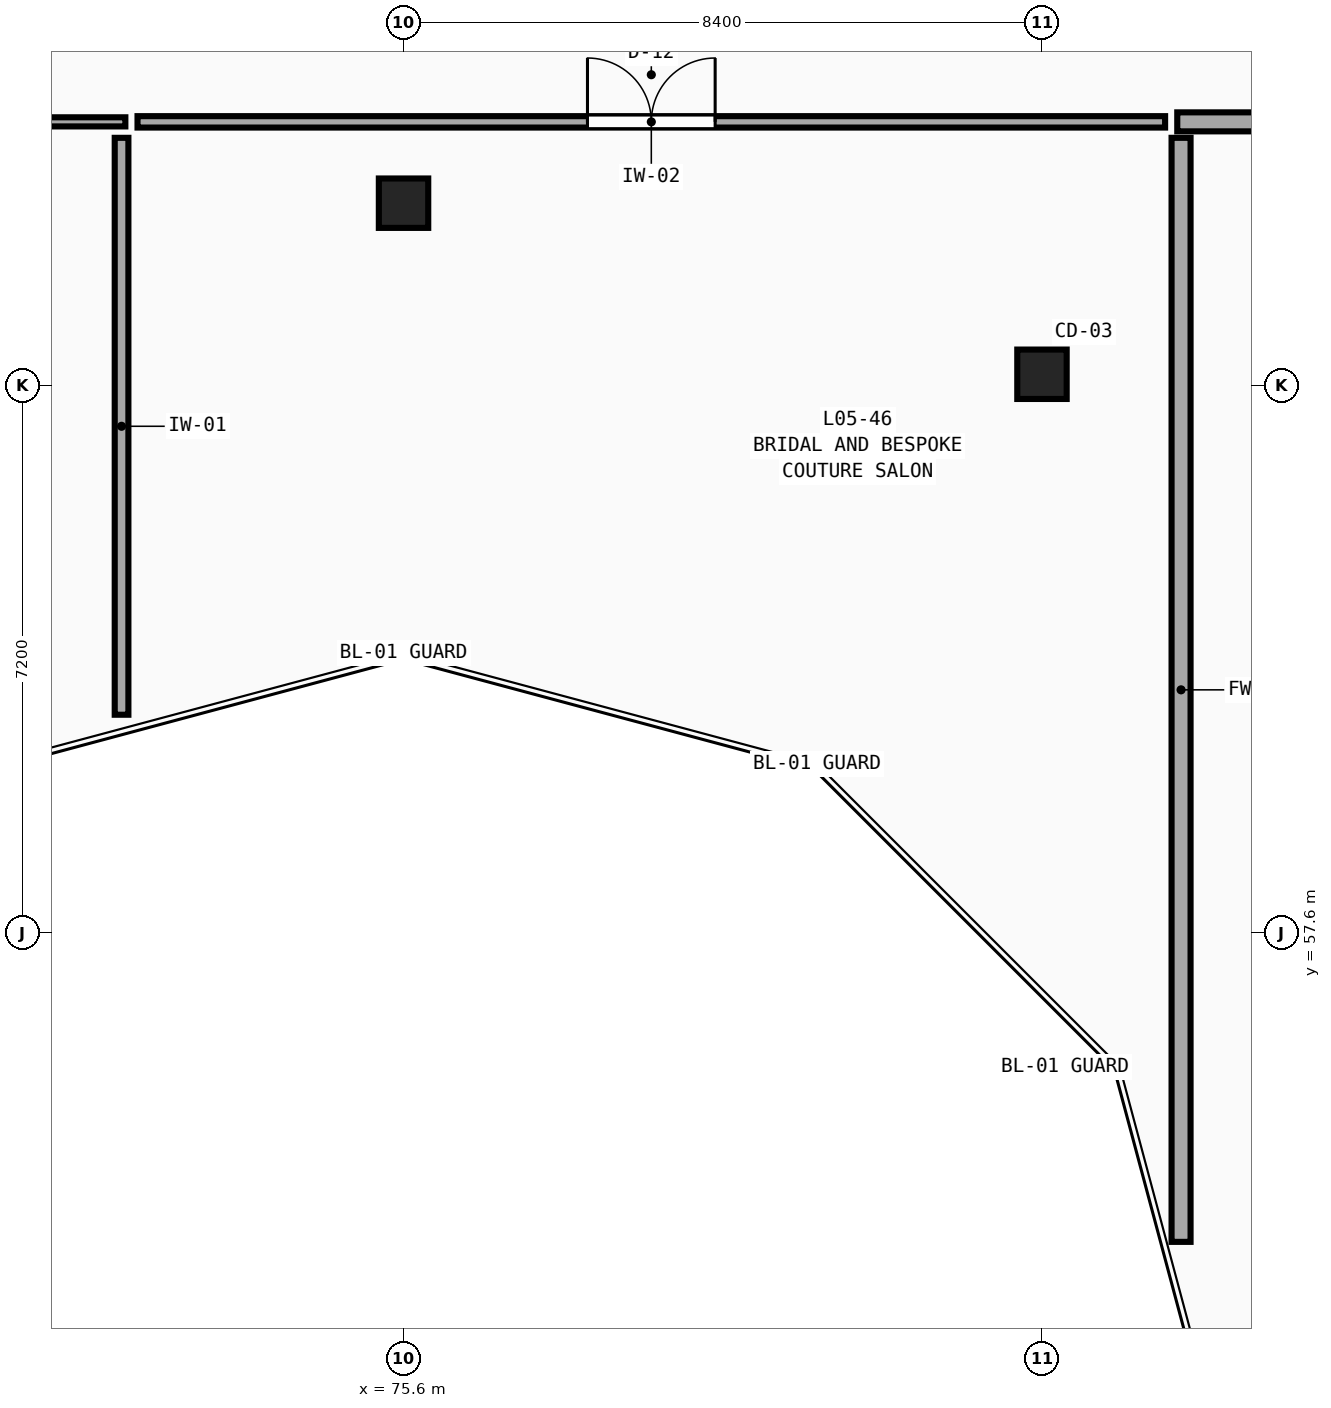
"""IFC4 building model, lengths in metres.
Left out: names, types, materials, properties, quantities, classifications, styles, units other than length and angle.
Written with IfcOpenShell. Run it as: python <this file> out.ifc"""

import sys

from ifc_helpers import new_model, si_unit, direction, frame, frame_2d, origin, origin_2d, place, context, subcontext, project, spatial, rectangle, circle, extrude, element, fill, save


model = new_model("IFC4")
c1 = context("Model", 3, precision=1e-05, world=origin(), true_north=direction((0.0, 1.0)))
c2 = subcontext(c1, "Body", "Model", "MODEL_VIEW")
j1 = project(units=[si_unit("LENGTHUNIT", "METRE"), si_unit("PLANEANGLEUNIT", "RADIAN")], contexts=[c1])
p1 = place(None, origin())
s1 = spatial("IfcSite", under=j1, at=p1, CompositionType="ELEMENT")
p2 = place(p1, origin())
s2 = spatial("IfcBuilding", under=s1, at=p2, CompositionType="ELEMENT")
p3 = place(p2, frame((0.0, 0.0, 23.4)))
s3 = spatial("IfcBuildingStorey", under=s2, at=p3, CompositionType="ELEMENT", Elevation=23.4)
for number, where, z_axis, x_axis in (
    (1, (84.0, 64.949, 0.0), (0.0, 0.0, 1.0), (1.0, 0.0, 0.0)),
    (2, (75.6, 67.2, 0.0), (0.0, 0.0, 1.0), (1.0, 0.0, 0.0)),
):
    element("IfcColumn", number, at=place(p3, frame(where, z_axis=z_axis, x_axis=x_axis)), inside=s3, PredefinedType="COLUMN", context=c2, shape_type="SweptSolid", body=[
        extrude(circle(Radius=0.325, at=origin_2d()), origin(), (0.0, 0.0, 1.0), 4.5),
    ])
p4 = place(p3, frame((55.68, 68.27, 0.0), z_axis=(0.0, 0.0, 1.0), x_axis=(1.0, 0.0, 0.0)))
e3 = element("IfcWall", 3, at=p4, inside=s3, PredefinedType="PARTITIONING", context=c2, shape_type="SweptSolid", body=[
    extrude(rectangle(XDim=16.26, YDim=0.12, at=frame_2d((8.13, 0.0))), origin(), (0.0, 0.0, 1.0), 4.21),
])
p5 = place(p4, frame((7.69, 0.0, 0.0)))
e4 = element("IfcOpeningElement", 4, at=p5, cuts=e3, PredefinedType="OPENING", context=c2, shape_type="SweptSolid", body=[
    extrude(rectangle(XDim=0.88, YDim=2.05, at=frame_2d((0.44, 1.025))), frame((0.0, 0.08, 0.0), z_axis=(0.0, -1.0, 0.0), x_axis=(1.0, 0.0, 0.0)), (0.0, 0.0, 1.0), 0.16),
])
p6 = place(p3, frame((72.1, 68.27, 0.0), z_axis=(0.0, 0.0, 1.0), x_axis=(1.0, 0.0, 0.0)))
e5 = element("IfcWall", 5, at=p6, inside=s3, PredefinedType="PARTITIONING", context=c2, shape_type="SweptSolid", body=[
    extrude(rectangle(XDim=13.52, YDim=0.15, at=frame_2d((6.76, 0.0))), origin(), (0.0, 0.0, 1.0), 4.21),
])
p7 = place(p6, frame((5.92, 0.0, 0.0)))
e6 = element("IfcOpeningElement", 6, at=p7, cuts=e5, PredefinedType="OPENING", context=c2, shape_type="SweptSolid", body=[
    extrude(rectangle(XDim=1.68, YDim=2.13, at=frame_2d((0.84, 1.065))), frame((0.0, 0.095, 0.0), z_axis=(0.0, -1.0, 0.0), x_axis=(1.0, 0.0, 0.0)), (0.0, 0.0, 1.0), 0.19),
])
p8 = place(p3, frame((85.78, 68.27, 0.0), z_axis=(0.0, 0.0, 1.0), x_axis=(1.0, 0.0, 0.0)))
e7 = element("IfcWall", 7, at=p8, inside=s3, PredefinedType="SOLIDWALL", context=c2, shape_type="SweptSolid", body=[
    extrude(rectangle(XDim=6.25, YDim=0.25, at=frame_2d((3.125, 0.0))), origin(), (0.0, 0.0, 1.0), 4.21),
])
p9 = place(p8, frame((2.6, 0.0, 0.0)))
e8 = element("IfcOpeningElement", 8, at=p9, cuts=e7, PredefinedType="OPENING", context=c2, shape_type="SweptSolid", body=[
    extrude(rectangle(XDim=1.05, YDim=2.15, at=frame_2d((0.525, 1.075))), frame((0.0, 0.145, 0.0), z_axis=(0.0, -1.0, 0.0), x_axis=(1.0, 0.0, 0.0)), (0.0, 0.0, 1.0), 0.29),
])
p10 = place(p3, frame((85.83, 53.535, 0.0), z_axis=(0.0, 0.0, 1.0), x_axis=(0.0, 1.0, 0.0)))
e9 = element("IfcWall", 9, at=p10, inside=s3, PredefinedType="SOLIDWALL", context=c2, shape_type="SweptSolid", body=[
    extrude(rectangle(XDim=14.525, YDim=0.25, at=frame_2d((7.263, 0.0))), origin(), (0.0, 0.0, 1.0), 4.21),
])
p11 = place(p3, frame((71.89, 60.47, 0.0), z_axis=(0.0, 0.0, 1.0), x_axis=(0.0, 1.0, 0.0)))
e10 = element("IfcWall", 10, at=p11, inside=s3, PredefinedType="PARTITIONING", context=c2, shape_type="SweptSolid", body=[
    extrude(rectangle(XDim=7.59, YDim=0.18, at=frame_2d((3.795, 0.0))), origin(), (0.0, 0.0, 1.0), 4.21),
])
p12 = place(p7, origin())
e11 = element("IfcDoor", 11, at=p12, inside=s3, OperationType="DOUBLE_DOOR_SINGLE_SWING", PredefinedType="DOOR", context=c2, shape_type="SweptSolid", body=[
    extrude(rectangle(XDim=1.68, YDim=2.13, at=frame_2d((0.84, 1.065))), frame((0.0, 0.025, 0.0), z_axis=(0.0, -1.0, 0.0), x_axis=(1.0, 0.0, 0.0)), (0.0, 0.0, 1.0), 0.05),
])
fill(e6, e11)
save(model, sys.argv[1])
